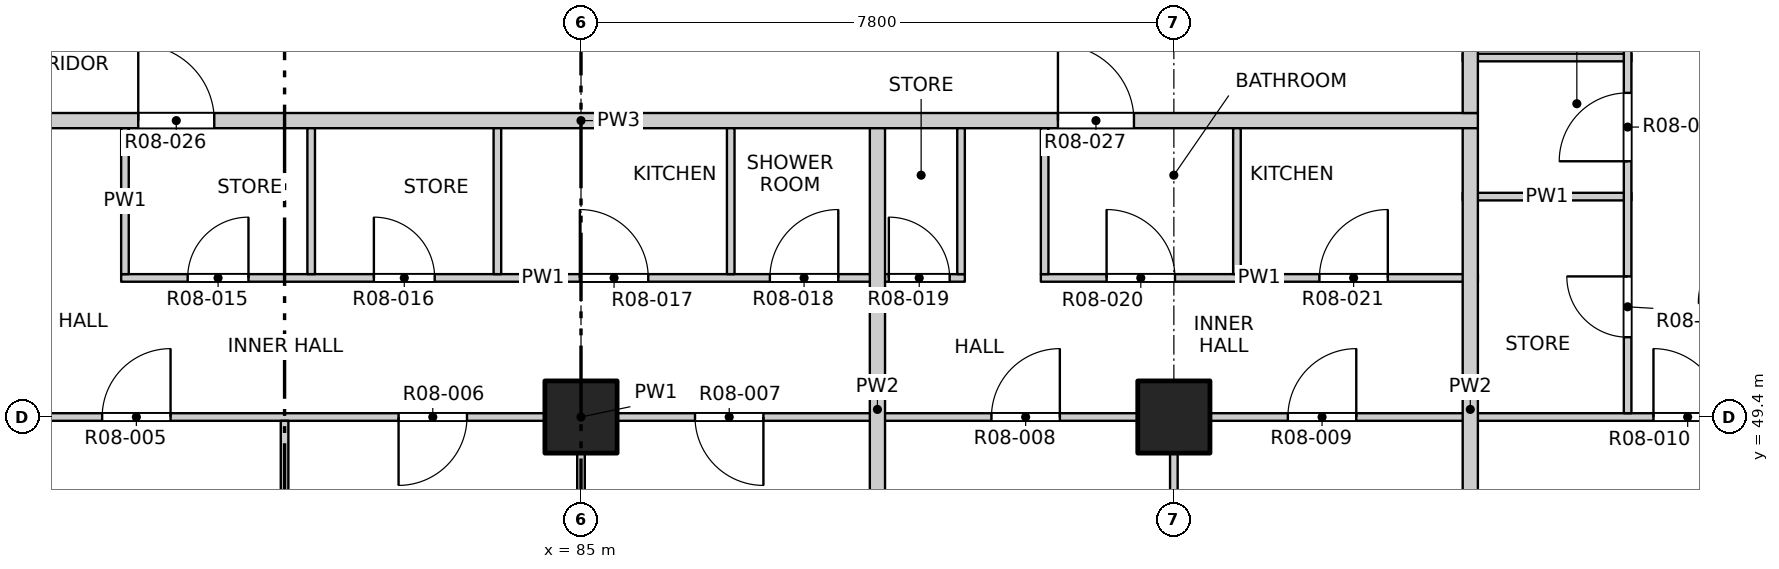
"""IFC4 building model, lengths in metres.
Left out: names, types, materials, properties, quantities, classifications, styles, units other than length and angle.
Written with IfcOpenShell. Run it as: python <this file> out.ifc"""

import sys

from ifc_helpers import new_model, si_unit, direction, frame, frame_2d, origin, origin_2d, place, context, subcontext, project, spatial, rectangle, extrude, element, fill, save


model = new_model("IFC4")
c1 = context("Model", 3, precision=1e-05, world=origin(), true_north=direction((0.0, 1.0)))
c2 = subcontext(c1, "Body", "Model", "MODEL_VIEW")
j1 = project(units=[si_unit("LENGTHUNIT", "METRE"), si_unit("PLANEANGLEUNIT", "RADIAN")], contexts=[c1])
p1 = place(None, origin())
s1 = spatial("IfcSite", under=j1, at=p1, CompositionType="ELEMENT")
p2 = place(p1, origin())
s2 = spatial("IfcBuilding", under=s1, at=p2, CompositionType="ELEMENT")
p3 = place(p2, frame((0.0, 0.0, 99.9)))
s3 = spatial("IfcBuildingStorey", under=s2, at=p3, CompositionType="ELEMENT", Elevation=99.9)
for number, where, z_axis, x_axis in (
    (1, (85.0, 49.4, -0.3), (0.0, 0.0, 1.0), (1.0, 0.0, 0.0)),
    (2, (92.8, 49.4, -0.3), (0.0, 0.0, 1.0), (1.0, 0.0, 0.0)),
):
    element("IfcColumn", number, at=place(p3, frame(where, z_axis=z_axis, x_axis=x_axis)), inside=s3, PredefinedType="COLUMN", context=c2, shape_type="SweptSolid", body=[
        extrude(rectangle(XDim=0.95, YDim=0.95, at=origin_2d()), origin(), (0.0, 0.0, 1.0), 3.45),
    ])
p4 = place(p3, frame((65.8, 49.4, 0.0), z_axis=(0.0, 0.0, 1.0), x_axis=(1.0, 0.0, 0.0)))
e3 = element("IfcWall", 3, at=p4, inside=s3, PredefinedType="PARTITIONING", context=c2, shape_type="SweptSolid", body=[
    extrude(rectangle(XDim=38.4, YDim=0.1, at=frame_2d((19.2, 0.0))), origin(), (0.0, 0.0, 1.0), 3.15),
])
p5 = place(p4, frame((4.19, 0.0, 0.0)))
e4 = element("IfcOpeningElement", 4, at=p5, cuts=e3, PredefinedType="OPENING", context=c2, shape_type="SweptSolid", body=[
    extrude(rectangle(XDim=0.9, YDim=2.1, at=frame_2d((0.45, 1.05))), frame((0.0, 0.06, 0.0), z_axis=(0.0, -1.0, 0.0), x_axis=(1.0, 0.0, 0.0)), (0.0, 0.0, 1.0), 0.12),
])
p6 = place(p4, frame((9.0, 0.0, 0.0)))
e5 = element("IfcOpeningElement", 5, at=p6, cuts=e3, PredefinedType="OPENING", context=c2, shape_type="SweptSolid", body=[
    extrude(rectangle(XDim=0.9, YDim=2.1, at=frame_2d((0.45, 1.05))), frame((0.0, 0.06, 0.0), z_axis=(0.0, -1.0, 0.0), x_axis=(1.0, 0.0, 0.0)), (0.0, 0.0, 1.0), 0.12),
])
p7 = place(p4, frame((12.9, 0.0, 0.0)))
e6 = element("IfcOpeningElement", 6, at=p7, cuts=e3, PredefinedType="OPENING", context=c2, shape_type="SweptSolid", body=[
    extrude(rectangle(XDim=0.9, YDim=2.1, at=frame_2d((0.45, 1.05))), frame((0.0, 0.06, 0.0), z_axis=(0.0, -1.0, 0.0), x_axis=(1.0, 0.0, 0.0)), (0.0, 0.0, 1.0), 0.12),
])
p8 = place(p4, frame((16.8, 0.0, 0.0)))
e7 = element("IfcOpeningElement", 7, at=p8, cuts=e3, PredefinedType="OPENING", context=c2, shape_type="SweptSolid", body=[
    extrude(rectangle(XDim=0.9, YDim=2.1, at=frame_2d((0.45, 1.05))), frame((0.0, 0.06, 0.0), z_axis=(0.0, -1.0, 0.0), x_axis=(1.0, 0.0, 0.0)), (0.0, 0.0, 1.0), 0.12),
])
p9 = place(p4, frame((20.7, 0.0, 0.0)))
e8 = element("IfcOpeningElement", 8, at=p9, cuts=e3, PredefinedType="OPENING", context=c2, shape_type="SweptSolid", body=[
    extrude(rectangle(XDim=0.9, YDim=2.1, at=frame_2d((0.45, 1.05))), frame((0.0, 0.06, 0.0), z_axis=(0.0, -1.0, 0.0), x_axis=(1.0, 0.0, 0.0)), (0.0, 0.0, 1.0), 0.12),
])
p10 = place(p4, frame((24.6, 0.0, 0.0)))
e9 = element("IfcOpeningElement", 9, at=p10, cuts=e3, PredefinedType="OPENING", context=c2, shape_type="SweptSolid", body=[
    extrude(rectangle(XDim=0.9, YDim=2.1, at=frame_2d((0.45, 1.05))), frame((0.0, 0.06, 0.0), z_axis=(0.0, -1.0, 0.0), x_axis=(1.0, 0.0, 0.0)), (0.0, 0.0, 1.0), 0.12),
])
p11 = place(p4, frame((28.5, 0.0, 0.0)))
e10 = element("IfcOpeningElement", 10, at=p11, cuts=e3, PredefinedType="OPENING", context=c2, shape_type="SweptSolid", body=[
    extrude(rectangle(XDim=0.9, YDim=2.1, at=frame_2d((0.45, 1.05))), frame((0.0, 0.06, 0.0), z_axis=(0.0, -1.0, 0.0), x_axis=(1.0, 0.0, 0.0)), (0.0, 0.0, 1.0), 0.12),
])
p12 = place(p4, frame((33.31, 0.0, 0.0)))
e11 = element("IfcOpeningElement", 11, at=p12, cuts=e3, PredefinedType="OPENING", context=c2, shape_type="SweptSolid", body=[
    extrude(rectangle(XDim=0.9, YDim=2.1, at=frame_2d((0.45, 1.05))), frame((0.0, 0.06, 0.0), z_axis=(0.0, -1.0, 0.0), x_axis=(1.0, 0.0, 0.0)), (0.0, 0.0, 1.0), 0.12),
])
p13 = place(p3, frame((78.95, 51.23, 0.0), z_axis=(0.0, 0.0, 1.0), x_axis=(1.0, 0.0, 0.0)))
e12 = element("IfcWall", 12, at=p13, inside=s3, PredefinedType="PARTITIONING", context=c2, shape_type="SweptSolid", body=[
    extrude(rectangle(XDim=11.1, YDim=0.1, at=frame_2d((5.55, 0.0))), origin(), (0.0, 0.0, 1.0), 3.15),
])
p14 = place(p13, frame((0.875, 0.0, 0.0)))
e13 = element("IfcOpeningElement", 13, at=p14, cuts=e12, PredefinedType="OPENING", context=c2, shape_type="SweptSolid", body=[
    extrude(rectangle(XDim=0.8, YDim=2.1, at=frame_2d((0.4, 1.05))), frame((0.0, 0.06, 0.0), z_axis=(0.0, -1.0, 0.0), x_axis=(1.0, 0.0, 0.0)), (0.0, 0.0, 1.0), 0.12),
])
p15 = place(p13, frame((3.325, 0.0, 0.0)))
e14 = element("IfcOpeningElement", 14, at=p15, cuts=e12, PredefinedType="OPENING", context=c2, shape_type="SweptSolid", body=[
    extrude(rectangle(XDim=0.8, YDim=2.1, at=frame_2d((0.4, 1.05))), frame((0.0, 0.06, 0.0), z_axis=(0.0, -1.0, 0.0), x_axis=(1.0, 0.0, 0.0)), (0.0, 0.0, 1.0), 0.12),
])
p16 = place(p13, frame((6.035, 0.0, 0.0)))
e15 = element("IfcOpeningElement", 15, at=p16, cuts=e12, PredefinedType="OPENING", context=c2, shape_type="SweptSolid", body=[
    extrude(rectangle(XDim=0.9, YDim=2.1, at=frame_2d((0.45, 1.05))), frame((0.0, 0.06, 0.0), z_axis=(0.0, -1.0, 0.0), x_axis=(1.0, 0.0, 0.0)), (0.0, 0.0, 1.0), 0.12),
])
p17 = place(p13, frame((8.535, 0.0, 0.0)))
e16 = element("IfcOpeningElement", 16, at=p17, cuts=e12, PredefinedType="OPENING", context=c2, shape_type="SweptSolid", body=[
    extrude(rectangle(XDim=0.9, YDim=2.1, at=frame_2d((0.45, 1.05))), frame((0.0, 0.06, 0.0), z_axis=(0.0, -1.0, 0.0), x_axis=(1.0, 0.0, 0.0)), (0.0, 0.0, 1.0), 0.12),
])
p18 = place(p13, frame((10.1, 0.0, 0.0)))
e17 = element("IfcOpeningElement", 17, at=p18, cuts=e12, PredefinedType="OPENING", context=c2, shape_type="SweptSolid", body=[
    extrude(rectangle(XDim=0.8, YDim=2.1, at=frame_2d((0.4, 1.05))), frame((0.0, 0.06, 0.0), z_axis=(0.0, -1.0, 0.0), x_axis=(1.0, 0.0, 0.0)), (0.0, 0.0, 1.0), 0.12),
])
p19 = place(p3, frame((91.05, 51.23, 0.0), z_axis=(0.0, 0.0, 1.0), x_axis=(1.0, 0.0, 0.0)))
e18 = element("IfcWall", 18, at=p19, inside=s3, PredefinedType="PARTITIONING", context=c2, shape_type="SweptSolid", body=[
    extrude(rectangle(XDim=5.75, YDim=0.1, at=frame_2d((2.875, 0.0))), origin(), (0.0, 0.0, 1.0), 3.15),
])
p20 = place(p19, frame((0.865, 0.0, 0.0)))
e19 = element("IfcOpeningElement", 19, at=p20, cuts=e18, PredefinedType="OPENING", context=c2, shape_type="SweptSolid", body=[
    extrude(rectangle(XDim=0.9, YDim=2.1, at=frame_2d((0.45, 1.05))), frame((0.0, 0.06, 0.0), z_axis=(0.0, -1.0, 0.0), x_axis=(1.0, 0.0, 0.0)), (0.0, 0.0, 1.0), 0.12),
])
p21 = place(p19, frame((3.665, 0.0, 0.0)))
e20 = element("IfcOpeningElement", 20, at=p21, cuts=e18, PredefinedType="OPENING", context=c2, shape_type="SweptSolid", body=[
    extrude(rectangle(XDim=0.9, YDim=2.1, at=frame_2d((0.45, 1.05))), frame((0.0, 0.06, 0.0), z_axis=(0.0, -1.0, 0.0), x_axis=(1.0, 0.0, 0.0)), (0.0, 0.0, 1.0), 0.12),
])
p22 = place(p3, frame((96.6, 52.3, 0.0), z_axis=(0.0, 0.0, 1.0), x_axis=(1.0, 0.0, 0.0)))
e21 = element("IfcWall", 21, at=p22, inside=s3, PredefinedType="PARTITIONING", context=c2, shape_type="SweptSolid", body=[
    extrude(rectangle(XDim=2.22, YDim=0.1, at=frame_2d((1.11, 0.0))), origin(), (0.0, 0.0, 1.0), 3.15),
])
p23 = place(p3, frame((73.2, 53.3, 0.0), z_axis=(0.0, 0.0, 1.0), x_axis=(1.0, 0.0, 0.0)))
e22 = element("IfcWall", 22, at=p23, inside=s3, PredefinedType="PARTITIONING", context=c2, shape_type="SweptSolid", body=[
    extrude(rectangle(XDim=23.6, YDim=0.2, at=frame_2d((11.8, 0.0))), origin(), (0.0, 0.0, 1.0), 3.15),
])
p24 = place(p23, frame((5.975, 0.0, 0.0)))
e23 = element("IfcOpeningElement", 23, at=p24, cuts=e22, PredefinedType="OPENING", context=c2, shape_type="SweptSolid", body=[
    extrude(rectangle(XDim=1.0, YDim=2.1, at=frame_2d((0.5, 1.05))), frame((0.0, 0.11, 0.0), z_axis=(0.0, -1.0, 0.0), x_axis=(1.0, 0.0, 0.0)), (0.0, 0.0, 1.0), 0.22),
])
p25 = place(p23, frame((18.075, 0.0, 0.0)))
e24 = element("IfcOpeningElement", 24, at=p25, cuts=e22, PredefinedType="OPENING", context=c2, shape_type="SweptSolid", body=[
    extrude(rectangle(XDim=1.0, YDim=2.1, at=frame_2d((0.5, 1.05))), frame((0.0, 0.11, 0.0), z_axis=(0.0, -1.0, 0.0), x_axis=(1.0, 0.0, 0.0)), (0.0, 0.0, 1.0), 0.22),
])
p26 = place(p3, frame((96.6, 54.13, 0.0), z_axis=(0.0, 0.0, 1.0), x_axis=(1.0, 0.0, 0.0)))
e25 = element("IfcWall", 25, at=p26, inside=s3, PredefinedType="PARTITIONING", context=c2, shape_type="SweptSolid", body=[
    extrude(rectangle(XDim=2.22, YDim=0.1, at=frame_2d((1.11, 0.0))), origin(), (0.0, 0.0, 1.0), 3.15),
])
p27 = place(p3, frame((79.0, 51.28, 0.0), z_axis=(0.0, 0.0, 1.0), x_axis=(0.0, 1.0, 0.0)))
e26 = element("IfcWall", 26, at=p27, inside=s3, PredefinedType="PARTITIONING", context=c2, shape_type="SweptSolid", body=[
    extrude(rectangle(XDim=1.92, YDim=0.1, at=frame_2d((0.96, 0.0))), origin(), (0.0, 0.0, 1.0), 3.15),
])
p28 = place(p3, frame((81.1, 45.8, 0.0), z_axis=(0.0, 0.0, 1.0), x_axis=(0.0, 1.0, 0.0)))
e27 = element("IfcWall", 27, at=p28, inside=s3, PredefinedType="PARTITIONING", context=c2, shape_type="SweptSolid", body=[
    extrude(rectangle(XDim=3.55, YDim=0.1, at=frame_2d((1.775, 0.0))), origin(), (0.0, 0.0, 1.0), 2.55),
])
for number, where, z_axis, x_axis in (
    (28, (81.45, 51.28, 0.0), (0.0, 0.0, 1.0), (0.0, 1.0, 0.0)),
    (29, (83.9, 51.28, 0.0), (0.0, 0.0, 1.0), (0.0, 1.0, 0.0)),
):
    element("IfcWall", number, at=place(p3, frame(where, z_axis=z_axis, x_axis=x_axis)), inside=s3, PredefinedType="PARTITIONING", context=c2, shape_type="SweptSolid", body=[
        extrude(rectangle(XDim=1.92, YDim=0.1, at=frame_2d((0.96, 0.0))), origin(), (0.0, 0.0, 1.0), 3.15),
    ])
p29 = place(p3, frame((85.0, 45.8, 0.0), z_axis=(0.0, 0.0, 1.0), x_axis=(0.0, 1.0, 0.0)))
e30 = element("IfcWall", 30, at=p29, inside=s3, PredefinedType="PARTITIONING", context=c2, shape_type="SweptSolid", body=[
    extrude(rectangle(XDim=3.55, YDim=0.1, at=frame_2d((1.775, 0.0))), origin(), (0.0, 0.0, 1.0), 3.15),
])
p30 = place(p3, frame((86.97, 51.28, 0.0), z_axis=(0.0, 0.0, 1.0), x_axis=(0.0, 1.0, 0.0)))
e31 = element("IfcWall", 31, at=p30, inside=s3, PredefinedType="PARTITIONING", context=c2, shape_type="SweptSolid", body=[
    extrude(rectangle(XDim=1.92, YDim=0.1, at=frame_2d((0.96, 0.0))), origin(), (0.0, 0.0, 1.0), 3.15),
])
p31 = place(p3, frame((88.9, 45.8, 0.0), z_axis=(0.0, 0.0, 1.0), x_axis=(0.0, 1.0, 0.0)))
e32 = element("IfcWall", 32, at=p31, inside=s3, PredefinedType="PARTITIONING", context=c2, shape_type="SweptSolid", body=[
    extrude(rectangle(XDim=7.4, YDim=0.2, at=frame_2d((3.7, 0.0))), origin(), (0.0, 0.0, 1.0), 2.55),
])
for number, where, z_axis, x_axis in (
    (33, (90.0, 51.28, 0.0), (0.0, 0.0, 1.0), (0.0, 1.0, 0.0)),
    (34, (91.1, 51.28, 0.0), (0.0, 0.0, 1.0), (0.0, 1.0, 0.0)),
):
    element("IfcWall", number, at=place(p3, frame(where, z_axis=z_axis, x_axis=x_axis)), inside=s3, PredefinedType="PARTITIONING", context=c2, shape_type="SweptSolid", body=[
        extrude(rectangle(XDim=1.92, YDim=0.1, at=frame_2d((0.96, 0.0))), origin(), (0.0, 0.0, 1.0), 3.15),
    ])
p32 = place(p3, frame((92.8, 45.8, 0.0), z_axis=(0.0, 0.0, 1.0), x_axis=(0.0, 1.0, 0.0)))
e35 = element("IfcWall", 35, at=p32, inside=s3, PredefinedType="PARTITIONING", context=c2, shape_type="SweptSolid", body=[
    extrude(rectangle(XDim=3.55, YDim=0.1, at=frame_2d((1.775, 0.0))), origin(), (0.0, 0.0, 1.0), 3.15),
])
p33 = place(p3, frame((93.63, 51.28, 0.0), z_axis=(0.0, 0.0, 1.0), x_axis=(0.0, 1.0, 0.0)))
e36 = element("IfcWall", 36, at=p33, inside=s3, PredefinedType="PARTITIONING", context=c2, shape_type="SweptSolid", body=[
    extrude(rectangle(XDim=1.92, YDim=0.1, at=frame_2d((0.96, 0.0))), origin(), (0.0, 0.0, 1.0), 3.15),
])
p34 = place(p3, frame((96.7, 45.8, 0.0), z_axis=(0.0, 0.0, 1.0), x_axis=(0.0, 1.0, 0.0)))
e37 = element("IfcWall", 37, at=p34, inside=s3, PredefinedType="PARTITIONING", context=c2, shape_type="SweptSolid", body=[
    extrude(rectangle(XDim=7.4, YDim=0.2, at=frame_2d((3.7, 0.0))), origin(), (0.0, 0.0, 1.0), 3.15),
])
p35 = place(p3, frame((96.7, 53.4, 0.0), z_axis=(0.0, 0.0, 1.0), x_axis=(0.0, 1.0, 0.0)))
e38 = element("IfcWall", 38, at=p35, inside=s3, PredefinedType="PARTITIONING", context=c2, shape_type="SweptSolid", body=[
    extrude(rectangle(XDim=30.8, YDim=0.2, at=frame_2d((15.4, 0.0))), origin(), (0.0, 0.0, 1.0), 3.15),
])
p36 = place(p35, frame((5.525, 0.0, 0.0)))
e39 = element("IfcOpeningElement", 39, at=p36, cuts=e38, PredefinedType="OPENING", context=c2, shape_type="SweptSolid", body=[
    extrude(rectangle(XDim=1.0, YDim=2.1, at=frame_2d((0.5, 1.05))), frame((0.0, 0.11, 0.0), z_axis=(0.0, -1.0, 0.0), x_axis=(1.0, 0.0, 0.0)), (0.0, 0.0, 1.0), 0.22),
])
p37 = place(p35, frame((13.775, 0.0, 0.0)))
e40 = element("IfcOpeningElement", 40, at=p37, cuts=e38, PredefinedType="OPENING", context=c2, shape_type="SweptSolid", body=[
    extrude(rectangle(XDim=1.0, YDim=2.1, at=frame_2d((0.5, 1.05))), frame((0.0, 0.11, 0.0), z_axis=(0.0, -1.0, 0.0), x_axis=(1.0, 0.0, 0.0)), (0.0, 0.0, 1.0), 0.22),
])
p38 = place(p35, frame((22.125, 0.0, 0.0)))
e41 = element("IfcOpeningElement", 41, at=p38, cuts=e38, PredefinedType="OPENING", context=c2, shape_type="SweptSolid", body=[
    extrude(rectangle(XDim=1.0, YDim=2.1, at=frame_2d((0.5, 1.05))), frame((0.0, 0.11, 0.0), z_axis=(0.0, -1.0, 0.0), x_axis=(1.0, 0.0, 0.0)), (0.0, 0.0, 1.0), 0.22),
])
p39 = place(p3, frame((98.77, 49.45, 0.0), z_axis=(0.0, 0.0, 1.0), x_axis=(0.0, 1.0, 0.0)))
e42 = element("IfcWall", 42, at=p39, inside=s3, PredefinedType="PARTITIONING", context=c2, shape_type="SweptSolid", body=[
    extrude(rectangle(XDim=8.15, YDim=0.1, at=frame_2d((4.075, 0.0))), origin(), (0.0, 0.0, 1.0), 3.15),
])
p40 = place(p39, frame((1.0, 0.0, 0.0)))
e43 = element("IfcOpeningElement", 43, at=p40, cuts=e42, PredefinedType="OPENING", context=c2, shape_type="SweptSolid", body=[
    extrude(rectangle(XDim=0.8, YDim=2.1, at=frame_2d((0.4, 1.05))), frame((0.0, 0.06, 0.0), z_axis=(0.0, -1.0, 0.0), x_axis=(1.0, 0.0, 0.0)), (0.0, 0.0, 1.0), 0.12),
])
p41 = place(p39, frame((3.315, 0.0, 0.0)))
e44 = element("IfcOpeningElement", 44, at=p41, cuts=e42, PredefinedType="OPENING", context=c2, shape_type="SweptSolid", body=[
    extrude(rectangle(XDim=0.9, YDim=2.1, at=frame_2d((0.45, 1.05))), frame((0.0, 0.06, 0.0), z_axis=(0.0, -1.0, 0.0), x_axis=(1.0, 0.0, 0.0)), (0.0, 0.0, 1.0), 0.12),
])
p42 = place(p39, frame((5.99, 0.0, 0.0)))
e45 = element("IfcOpeningElement", 45, at=p42, cuts=e42, PredefinedType="OPENING", context=c2, shape_type="SweptSolid", body=[
    extrude(rectangle(XDim=0.9, YDim=2.1, at=frame_2d((0.45, 1.05))), frame((0.0, 0.06, 0.0), z_axis=(0.0, -1.0, 0.0), x_axis=(1.0, 0.0, 0.0)), (0.0, 0.0, 1.0), 0.12),
])
p43 = place(p7, origin())
e46 = element("IfcDoor", 46, at=p43, inside=s3, OperationType="SINGLE_SWING_RIGHT", PredefinedType="DOOR", context=c2, shape_type="SweptSolid", body=[
    extrude(rectangle(XDim=0.9, YDim=2.1, at=frame_2d((0.45, 1.05))), frame((0.0, 0.025, 0.0), z_axis=(0.0, -1.0, 0.0), x_axis=(1.0, 0.0, 0.0)), (0.0, 0.0, 1.0), 0.05),
])
fill(e6, e46)
p44 = place(p8, origin())
e47 = element("IfcDoor", 47, at=p44, inside=s3, OperationType="SINGLE_SWING_RIGHT", PredefinedType="DOOR", context=c2, shape_type="SweptSolid", body=[
    extrude(rectangle(XDim=0.9, YDim=2.1, at=frame_2d((0.45, 1.05))), frame((0.0, 0.025, 0.0), z_axis=(0.0, -1.0, 0.0), x_axis=(1.0, 0.0, 0.0)), (0.0, 0.0, 1.0), 0.05),
])
fill(e7, e47)
p45 = place(p9, origin())
e48 = element("IfcDoor", 48, at=p45, inside=s3, OperationType="SINGLE_SWING_LEFT", PredefinedType="DOOR", context=c2, shape_type="SweptSolid", body=[
    extrude(rectangle(XDim=0.9, YDim=2.1, at=frame_2d((0.45, 1.05))), frame((0.0, 0.025, 0.0), z_axis=(0.0, -1.0, 0.0), x_axis=(1.0, 0.0, 0.0)), (0.0, 0.0, 1.0), 0.05),
])
fill(e8, e48)
p46 = place(p10, origin())
e49 = element("IfcDoor", 49, at=p46, inside=s3, OperationType="SINGLE_SWING_RIGHT", PredefinedType="DOOR", context=c2, shape_type="SweptSolid", body=[
    extrude(rectangle(XDim=0.9, YDim=2.1, at=frame_2d((0.45, 1.05))), frame((0.0, 0.025, 0.0), z_axis=(0.0, -1.0, 0.0), x_axis=(1.0, 0.0, 0.0)), (0.0, 0.0, 1.0), 0.05),
])
fill(e9, e49)
p47 = place(p11, origin())
e50 = element("IfcDoor", 50, at=p47, inside=s3, OperationType="SINGLE_SWING_RIGHT", PredefinedType="DOOR", context=c2, shape_type="SweptSolid", body=[
    extrude(rectangle(XDim=0.9, YDim=2.1, at=frame_2d((0.45, 1.05))), frame((0.0, 0.025, 0.0), z_axis=(0.0, -1.0, 0.0), x_axis=(1.0, 0.0, 0.0)), (0.0, 0.0, 1.0), 0.05),
])
fill(e10, e50)
p48 = place(p12, origin())
e51 = element("IfcDoor", 51, at=p48, inside=s3, OperationType="SINGLE_SWING_LEFT", PredefinedType="DOOR", context=c2, shape_type="SweptSolid", body=[
    extrude(rectangle(XDim=0.9, YDim=2.1, at=frame_2d((0.45, 1.05))), frame((0.0, 0.025, 0.0), z_axis=(0.0, -1.0, 0.0), x_axis=(1.0, 0.0, 0.0)), (0.0, 0.0, 1.0), 0.05),
])
fill(e11, e51)
p49 = place(p40, origin())
e52 = element("IfcDoor", 52, at=p49, inside=s3, OperationType="SINGLE_SWING_RIGHT", PredefinedType="DOOR", context=c2, shape_type="SweptSolid", body=[
    extrude(rectangle(XDim=0.8, YDim=2.1, at=frame_2d((0.4, 1.05))), frame((0.0, 0.025, 0.0), z_axis=(0.0, -1.0, 0.0), x_axis=(1.0, 0.0, 0.0)), (0.0, 0.0, 1.0), 0.05),
])
fill(e43, e52)
p50 = place(p14, origin())
e53 = element("IfcDoor", 53, at=p50, inside=s3, OperationType="SINGLE_SWING_RIGHT", PredefinedType="DOOR", context=c2, shape_type="SweptSolid", body=[
    extrude(rectangle(XDim=0.8, YDim=2.1, at=frame_2d((0.4, 1.05))), frame((0.0, 0.025, 0.0), z_axis=(0.0, -1.0, 0.0), x_axis=(1.0, 0.0, 0.0)), (0.0, 0.0, 1.0), 0.05),
])
fill(e13, e53)
p51 = place(p15, origin())
e54 = element("IfcDoor", 54, at=p51, inside=s3, OperationType="SINGLE_SWING_LEFT", PredefinedType="DOOR", context=c2, shape_type="SweptSolid", body=[
    extrude(rectangle(XDim=0.8, YDim=2.1, at=frame_2d((0.4, 1.05))), frame((0.0, 0.025, 0.0), z_axis=(0.0, -1.0, 0.0), x_axis=(1.0, 0.0, 0.0)), (0.0, 0.0, 1.0), 0.05),
])
fill(e14, e54)
p52 = place(p16, origin())
e55 = element("IfcDoor", 55, at=p52, inside=s3, OperationType="SINGLE_SWING_LEFT", PredefinedType="DOOR", context=c2, shape_type="SweptSolid", body=[
    extrude(rectangle(XDim=0.9, YDim=2.1, at=frame_2d((0.45, 1.05))), frame((0.0, 0.025, 0.0), z_axis=(0.0, -1.0, 0.0), x_axis=(1.0, 0.0, 0.0)), (0.0, 0.0, 1.0), 0.05),
])
fill(e15, e55)
p53 = place(p17, origin())
e56 = element("IfcDoor", 56, at=p53, inside=s3, OperationType="SINGLE_SWING_RIGHT", PredefinedType="DOOR", context=c2, shape_type="SweptSolid", body=[
    extrude(rectangle(XDim=0.9, YDim=2.1, at=frame_2d((0.45, 1.05))), frame((0.0, 0.025, 0.0), z_axis=(0.0, -1.0, 0.0), x_axis=(1.0, 0.0, 0.0)), (0.0, 0.0, 1.0), 0.05),
])
fill(e16, e56)
p54 = place(p18, origin())
e57 = element("IfcDoor", 57, at=p54, inside=s3, OperationType="SINGLE_SWING_LEFT", PredefinedType="DOOR", context=c2, shape_type="SweptSolid", body=[
    extrude(rectangle(XDim=0.8, YDim=2.1, at=frame_2d((0.4, 1.05))), frame((0.0, 0.025, 0.0), z_axis=(0.0, -1.0, 0.0), x_axis=(1.0, 0.0, 0.0)), (0.0, 0.0, 1.0), 0.05),
])
fill(e17, e57)
p55 = place(p20, origin())
e58 = element("IfcDoor", 58, at=p55, inside=s3, OperationType="SINGLE_SWING_LEFT", PredefinedType="DOOR", context=c2, shape_type="SweptSolid", body=[
    extrude(rectangle(XDim=0.9, YDim=2.1, at=frame_2d((0.45, 1.05))), frame((0.0, 0.025, 0.0), z_axis=(0.0, -1.0, 0.0), x_axis=(1.0, 0.0, 0.0)), (0.0, 0.0, 1.0), 0.05),
])
fill(e19, e58)
p56 = place(p21, origin())
e59 = element("IfcDoor", 59, at=p56, inside=s3, OperationType="SINGLE_SWING_RIGHT", PredefinedType="DOOR", context=c2, shape_type="SweptSolid", body=[
    extrude(rectangle(XDim=0.9, YDim=2.1, at=frame_2d((0.45, 1.05))), frame((0.0, 0.025, 0.0), z_axis=(0.0, -1.0, 0.0), x_axis=(1.0, 0.0, 0.0)), (0.0, 0.0, 1.0), 0.05),
])
fill(e20, e59)
p57 = place(p41, origin())
e60 = element("IfcDoor", 60, at=p57, inside=s3, OperationType="SINGLE_SWING_LEFT", PredefinedType="DOOR", context=c2, shape_type="SweptSolid", body=[
    extrude(rectangle(XDim=0.9, YDim=2.1, at=frame_2d((0.45, 1.05))), frame((0.0, 0.025, 0.0), z_axis=(0.0, -1.0, 0.0), x_axis=(1.0, 0.0, 0.0)), (0.0, 0.0, 1.0), 0.05),
])
fill(e44, e60)
p58 = place(p24, origin())
e61 = element("IfcDoor", 61, at=p58, inside=s3, OperationType="SINGLE_SWING_LEFT", PredefinedType="DOOR", context=c2, shape_type="SweptSolid", body=[
    extrude(rectangle(XDim=1.0, YDim=2.1, at=frame_2d((0.5, 1.05))), frame((0.0, 0.025, 0.0), z_axis=(0.0, -1.0, 0.0), x_axis=(1.0, 0.0, 0.0)), (0.0, 0.0, 1.0), 0.05),
])
fill(e23, e61)
p59 = place(p25, origin())
e62 = element("IfcDoor", 62, at=p59, inside=s3, OperationType="SINGLE_SWING_LEFT", PredefinedType="DOOR", context=c2, shape_type="SweptSolid", body=[
    extrude(rectangle(XDim=1.0, YDim=2.1, at=frame_2d((0.5, 1.05))), frame((0.0, 0.025, 0.0), z_axis=(0.0, -1.0, 0.0), x_axis=(1.0, 0.0, 0.0)), (0.0, 0.0, 1.0), 0.05),
])
fill(e24, e62)
save(model, sys.argv[1])
